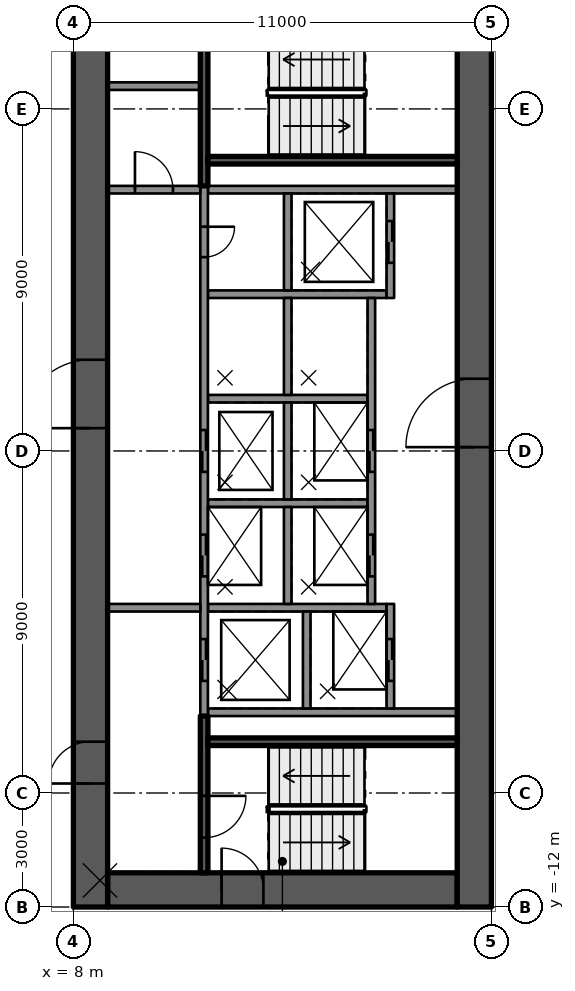
"""IFC4 building model, lengths in metres.
Left out: names, types, materials, properties, quantities, classifications, styles, units other than length and angle.
Written with IfcOpenShell. Run it as: python <this file> out.ifc"""

import sys

from ifc_helpers import new_model, si_unit, direction, frame, frame_2d, origin, place, context, subcontext, project, spatial, rectangle, extrude, element, fill, save


model = new_model("IFC4")
c1 = context("Model", 3, precision=1e-05, world=origin(), true_north=direction((0.0, 1.0)))
c2 = subcontext(c1, "Body", "Model", "MODEL_VIEW")
j1 = project(units=[si_unit("LENGTHUNIT", "METRE"), si_unit("PLANEANGLEUNIT", "RADIAN")], contexts=[c1])
p1 = place(None, origin())
s1 = spatial("IfcSite", under=j1, at=p1, CompositionType="ELEMENT")
p2 = place(p1, origin())
s2 = spatial("IfcBuilding", under=s1, at=p2, CompositionType="ELEMENT")
p3 = place(p2, frame((0.0, 0.0, 91.2)))
s3 = spatial("IfcBuildingStorey", under=s2, at=p3, CompositionType="ELEMENT", Elevation=91.2)
p4 = place(p3, frame((8.9, -11.55, 0.0), z_axis=(0.0, 0.0, 1.0), x_axis=(1.0, 0.0, 0.0)))
e1 = element("IfcWall", 1, at=p4, inside=s3, PredefinedType="SHEAR", context=c2, shape_type="SweptSolid", body=[
    extrude(rectangle(XDim=9.2, YDim=0.9, at=frame_2d((4.6, 0.0))), origin(), (0.0, 0.0, 1.0), 3.5),
])
p5 = place(p4, frame((3.0, 0.0, 0.0)))
e2 = element("IfcOpeningElement", 2, at=p5, cuts=e1, PredefinedType="OPENING", context=c2, shape_type="SweptSolid", body=[
    extrude(rectangle(XDim=1.1, YDim=2.1, at=frame_2d((0.55, 1.05))), frame((0.0, 0.46, 0.0), z_axis=(0.0, -1.0, 0.0), x_axis=(1.0, 0.0, 0.0)), (0.0, 0.0, 1.0), 0.92),
])
p6 = place(p3, frame((8.45, -12.0, 0.0), z_axis=(0.0, 0.0, 1.0), x_axis=(0.0, 1.0, 0.0)))
e3 = element("IfcWall", 3, at=p6, inside=s3, PredefinedType="SHEAR", context=c2, shape_type="SweptSolid", body=[
    extrude(rectangle(XDim=24.0, YDim=0.9, at=frame_2d((12.0, 0.0))), origin(), (0.0, 0.0, 1.0), 3.5),
])
p7 = place(p6, frame((12.6, 0.0, 0.0)))
e4 = element("IfcOpeningElement", 4, at=p7, cuts=e3, PredefinedType="OPENING", context=c2, shape_type="SweptSolid", body=[
    extrude(rectangle(XDim=1.8, YDim=2.1, at=frame_2d((0.9, 1.05))), frame((0.0, 0.46, 0.0), z_axis=(0.0, -1.0, 0.0), x_axis=(1.0, 0.0, 0.0)), (0.0, 0.0, 1.0), 0.92),
])
p8 = place(p6, frame((3.25, 0.0, 0.0)))
e5 = element("IfcOpeningElement", 5, at=p8, cuts=e3, PredefinedType="OPENING", context=c2, shape_type="SweptSolid", body=[
    extrude(rectangle(XDim=1.1, YDim=2.1, at=frame_2d((0.55, 1.05))), frame((0.0, 0.46, 0.0), z_axis=(0.0, -1.0, 0.0), x_axis=(1.0, 0.0, 0.0)), (0.0, 0.0, 1.0), 0.92),
])
p9 = place(p3, frame((18.55, -12.0, 0.0), z_axis=(0.0, 0.0, 1.0), x_axis=(0.0, 1.0, 0.0)))
e6 = element("IfcWall", 6, at=p9, inside=s3, PredefinedType="SHEAR", context=c2, shape_type="SweptSolid", body=[
    extrude(rectangle(XDim=24.0, YDim=0.9, at=frame_2d((12.0, 0.0))), origin(), (0.0, 0.0, 1.0), 3.5),
])
p10 = place(p9, frame((12.1, 0.0, 0.0)))
e7 = element("IfcOpeningElement", 7, at=p10, cuts=e6, PredefinedType="OPENING", context=c2, shape_type="SweptSolid", body=[
    extrude(rectangle(XDim=1.8, YDim=2.1, at=frame_2d((0.9, 1.05))), frame((0.0, 0.46, 0.0), z_axis=(0.0, -1.0, 0.0), x_axis=(1.0, 0.0, 0.0)), (0.0, 0.0, 1.0), 0.92),
])
for number, where, z_axis, x_axis in (
    (8, (11.54, -6.875, 0.0), (0.0, 0.0, 1.0), (1.0, 0.0, 0.0)),
    (9, (11.54, 6.875, 0.0), (0.0, 0.0, 1.0), (1.0, 0.0, 0.0)),
):
    element("IfcWall", number, at=place(p3, frame(where, z_axis=z_axis, x_axis=x_axis)), inside=s3, PredefinedType="SOLIDWALL", context=c2, shape_type="SweptSolid", body=[
        extrude(rectangle(XDim=6.56, YDim=0.2, at=frame_2d((3.28, 0.0))), origin(), (0.0, 0.0, 1.0), 3.09),
    ])
p11 = place(p3, frame((11.54, 4.125, 0.0), z_axis=(0.0, 0.0, 1.0), x_axis=(1.0, 0.0, 0.0)))
e10 = element("IfcWall", 10, at=p11, inside=s3, PredefinedType="SOLIDWALL", context=c2, shape_type="SweptSolid", body=[
    extrude(rectangle(XDim=4.7, YDim=0.2, at=frame_2d((2.35, 0.0))), origin(), (0.0, 0.0, 1.0), 3.09),
])
for number, where, z_axis, x_axis in (
    (11, (11.54, 1.375, 0.0), (0.0, 0.0, 1.0), (1.0, 0.0, 0.0)),
    (12, (11.54, -1.375, 0.0), (0.0, 0.0, 1.0), (1.0, 0.0, 0.0)),
):
    element("IfcWall", number, at=place(p3, frame(where, z_axis=z_axis, x_axis=x_axis)), inside=s3, PredefinedType="SOLIDWALL", context=c2, shape_type="SweptSolid", body=[
        extrude(rectangle(XDim=4.2, YDim=0.2, at=frame_2d((2.1, 0.0))), origin(), (0.0, 0.0, 1.0), 3.09),
    ])
p12 = place(p3, frame((11.54, -4.125, 0.0), z_axis=(0.0, 0.0, 1.0), x_axis=(1.0, 0.0, 0.0)))
e13 = element("IfcWall", 13, at=p12, inside=s3, PredefinedType="SOLIDWALL", context=c2, shape_type="SweptSolid", body=[
    extrude(rectangle(XDim=4.7, YDim=0.2, at=frame_2d((2.35, 0.0))), origin(), (0.0, 0.0, 1.0), 3.09),
])
p13 = place(p3, frame((11.44, 6.975, 0.0), z_axis=(0.0, 0.0, 1.0), x_axis=(0.0, -1.0, 0.0)))
e14 = element("IfcWall", 14, at=p13, inside=s3, PredefinedType="SOLIDWALL", context=c2, shape_type="SweptSolid", body=[
    extrude(rectangle(XDim=13.95, YDim=0.2, at=frame_2d((6.975, 0.0))), origin(), (0.0, 0.0, 1.0), 3.09),
])
p14 = place(p13, frame((6.425, 0.0, 0.0)))
e15 = element("IfcOpeningElement", 15, at=p14, cuts=e14, PredefinedType="OPENING", context=c2, shape_type="SweptSolid", body=[
    extrude(rectangle(XDim=1.1, YDim=2.1, at=frame_2d((0.55, 1.05))), frame((0.0, 0.11, 0.0), z_axis=(0.0, -1.0, 0.0), x_axis=(1.0, 0.0, 0.0)), (0.0, 0.0, 1.0), 0.22),
])
p15 = place(p13, frame((9.175, 0.0, 0.0)))
e16 = element("IfcOpeningElement", 16, at=p15, cuts=e14, PredefinedType="OPENING", context=c2, shape_type="SweptSolid", body=[
    extrude(rectangle(XDim=1.1, YDim=2.1, at=frame_2d((0.55, 1.05))), frame((0.0, 0.11, 0.0), z_axis=(0.0, -1.0, 0.0), x_axis=(1.0, 0.0, 0.0)), (0.0, 0.0, 1.0), 0.22),
])
p16 = place(p13, frame((11.925, 0.0, 0.0)))
e17 = element("IfcOpeningElement", 17, at=p16, cuts=e14, PredefinedType="OPENING", context=c2, shape_type="SweptSolid", body=[
    extrude(rectangle(XDim=1.1, YDim=2.1, at=frame_2d((0.55, 1.05))), frame((0.0, 0.11, 0.0), z_axis=(0.0, -1.0, 0.0), x_axis=(1.0, 0.0, 0.0)), (0.0, 0.0, 1.0), 0.22),
])
p17 = place(p13, frame((1.075, 0.0, 0.0)))
e18 = element("IfcOpeningElement", 18, at=p17, cuts=e14, PredefinedType="OPENING", context=c2, shape_type="SweptSolid", body=[
    extrude(rectangle(XDim=0.8, YDim=2.1, at=frame_2d((0.4, 1.05))), frame((0.0, 0.11, 0.0), z_axis=(0.0, -1.0, 0.0), x_axis=(1.0, 0.0, 0.0)), (0.0, 0.0, 1.0), 0.22),
])
for number, where, z_axis, x_axis in (
    (19, (13.64, 6.775, 0.0), (0.0, 0.0, 1.0), (0.0, -1.0, 0.0)),
    (20, (13.64, 4.025, 0.0), (0.0, 0.0, 1.0), (0.0, -1.0, 0.0)),
    (21, (13.64, 1.275, 0.0), (0.0, 0.0, 1.0), (0.0, -1.0, 0.0)),
    (22, (13.64, -1.475, 0.0), (0.0, 0.0, 1.0), (0.0, -1.0, 0.0)),
    (23, (14.14, -4.225, 0.0), (0.0, 0.0, 1.0), (0.0, -1.0, 0.0)),
):
    element("IfcWall", number, at=place(p3, frame(where, z_axis=z_axis, x_axis=x_axis)), inside=s3, PredefinedType="SOLIDWALL", context=c2, shape_type="SweptSolid", body=[
        extrude(rectangle(XDim=2.55, YDim=0.2, at=frame_2d((1.275, 0.0))), origin(), (0.0, 0.0, 1.0), 3.09),
    ])
p18 = place(p3, frame((16.34, 6.775, 0.0), z_axis=(0.0, 0.0, 1.0), x_axis=(0.0, -1.0, 0.0)))
e24 = element("IfcWall", 24, at=p18, inside=s3, PredefinedType="SOLIDWALL", context=c2, shape_type="SweptSolid", body=[
    extrude(rectangle(XDim=2.75, YDim=0.2, at=frame_2d((1.375, 0.0))), origin(), (0.0, 0.0, 1.0), 3.09),
])
p19 = place(p18, frame((0.725, 0.0, 0.0)))
e25 = element("IfcOpeningElement", 25, at=p19, cuts=e24, PredefinedType="OPENING", context=c2, shape_type="SweptSolid", body=[
    extrude(rectangle(XDim=1.1, YDim=2.1, at=frame_2d((0.55, 1.05))), frame((0.0, 0.11, 0.0), z_axis=(0.0, -1.0, 0.0), x_axis=(1.0, 0.0, 0.0)), (0.0, 0.0, 1.0), 0.22),
])
p20 = place(p3, frame((15.84, 4.025, 0.0), z_axis=(0.0, 0.0, 1.0), x_axis=(0.0, -1.0, 0.0)))
e26 = element("IfcWall", 26, at=p20, inside=s3, PredefinedType="SOLIDWALL", context=c2, shape_type="SweptSolid", body=[
    extrude(rectangle(XDim=8.05, YDim=0.2, at=frame_2d((4.025, 0.0))), origin(), (0.0, 0.0, 1.0), 3.09),
])
p21 = place(p20, frame((3.475, 0.0, 0.0)))
e27 = element("IfcOpeningElement", 27, at=p21, cuts=e26, PredefinedType="OPENING", context=c2, shape_type="SweptSolid", body=[
    extrude(rectangle(XDim=1.1, YDim=2.1, at=frame_2d((0.55, 1.05))), frame((0.0, 0.11, 0.0), z_axis=(0.0, -1.0, 0.0), x_axis=(1.0, 0.0, 0.0)), (0.0, 0.0, 1.0), 0.22),
])
p22 = place(p20, frame((6.225, 0.0, 0.0)))
e28 = element("IfcOpeningElement", 28, at=p22, cuts=e26, PredefinedType="OPENING", context=c2, shape_type="SweptSolid", body=[
    extrude(rectangle(XDim=1.1, YDim=2.1, at=frame_2d((0.55, 1.05))), frame((0.0, 0.11, 0.0), z_axis=(0.0, -1.0, 0.0), x_axis=(1.0, 0.0, 0.0)), (0.0, 0.0, 1.0), 0.22),
])
p23 = place(p3, frame((16.34, -4.025, 0.0), z_axis=(0.0, 0.0, 1.0), x_axis=(0.0, -1.0, 0.0)))
e29 = element("IfcWall", 29, at=p23, inside=s3, PredefinedType="SOLIDWALL", context=c2, shape_type="SweptSolid", body=[
    extrude(rectangle(XDim=2.75, YDim=0.2, at=frame_2d((1.375, 0.0))), origin(), (0.0, 0.0, 1.0), 3.09),
])
p24 = place(p23, frame((0.925, 0.0, 0.0)))
e30 = element("IfcOpeningElement", 30, at=p24, cuts=e29, PredefinedType="OPENING", context=c2, shape_type="SweptSolid", body=[
    extrude(rectangle(XDim=1.1, YDim=2.1, at=frame_2d((0.55, 1.05))), frame((0.0, 0.11, 0.0), z_axis=(0.0, -1.0, 0.0), x_axis=(1.0, 0.0, 0.0)), (0.0, 0.0, 1.0), 0.22),
])
p25 = place(p3, frame((11.44, -6.975, 0.0), z_axis=(0.0, 0.0, 1.0), x_axis=(0.0, -1.0, 0.0)))
e31 = element("IfcWall", 31, at=p25, inside=s3, PredefinedType="SOLIDWALL", context=c2, shape_type="SweptSolid", body=[
    extrude(rectangle(XDim=4.125, YDim=0.2, at=frame_2d((2.062, 0.0))), origin(), (0.0, 0.0, 1.0), 3.09),
])
p26 = place(p25, frame((2.1, 0.0, 0.0)))
e32 = element("IfcOpeningElement", 32, at=p26, cuts=e31, PredefinedType="OPENING", context=c2, shape_type="SweptSolid", body=[
    extrude(rectangle(XDim=1.1, YDim=2.1, at=frame_2d((0.55, 1.05))), frame((0.0, 0.11, 0.0), z_axis=(0.0, -1.0, 0.0), x_axis=(1.0, 0.0, 0.0)), (0.0, 0.0, 1.0), 0.22),
])
p27 = place(p3, frame((11.54, -7.65, 0.0), z_axis=(0.0, 0.0, 1.0), x_axis=(1.0, 0.0, 0.0)))
e33 = element("IfcWall", 33, at=p27, inside=s3, PredefinedType="SOLIDWALL", context=c2, shape_type="SweptSolid", body=[
    extrude(rectangle(XDim=6.56, YDim=0.2, at=frame_2d((3.28, 0.0))), origin(), (0.0, 0.0, 1.0), 3.09),
])
p28 = place(p3, frame((11.44, 11.1, 0.0), z_axis=(0.0, 0.0, 1.0), x_axis=(0.0, -1.0, 0.0)))
e34 = element("IfcWall", 34, at=p28, inside=s3, PredefinedType="SOLIDWALL", context=c2, shape_type="SweptSolid", body=[
    extrude(rectangle(XDim=4.125, YDim=0.2, at=frame_2d((2.062, 0.0))), origin(), (0.0, 0.0, 1.0), 3.09),
])
p29 = place(p3, frame((11.54, 7.65, 0.0), z_axis=(0.0, 0.0, 1.0), x_axis=(1.0, 0.0, 0.0)))
e35 = element("IfcWall", 35, at=p29, inside=s3, PredefinedType="SOLIDWALL", context=c2, shape_type="SweptSolid", body=[
    extrude(rectangle(XDim=6.56, YDim=0.2, at=frame_2d((3.28, 0.0))), origin(), (0.0, 0.0, 1.0), 3.09),
])
p30 = place(p3, frame((8.9, -4.125, 0.0), z_axis=(0.0, 0.0, 1.0), x_axis=(1.0, 0.0, 0.0)))
e36 = element("IfcWall", 36, at=p30, inside=s3, PredefinedType="PARTITIONING", context=c2, shape_type="SweptSolid", body=[
    extrude(rectangle(XDim=2.44, YDim=0.2, at=frame_2d((1.22, 0.0))), origin(), (0.0, 0.0, 1.0), 3.09),
])
p31 = place(p3, frame((8.9, 6.875, 0.0), z_axis=(0.0, 0.0, 1.0), x_axis=(1.0, 0.0, 0.0)))
e37 = element("IfcWall", 37, at=p31, inside=s3, PredefinedType="PARTITIONING", context=c2, shape_type="SweptSolid", body=[
    extrude(rectangle(XDim=2.44, YDim=0.2, at=frame_2d((1.22, 0.0))), origin(), (0.0, 0.0, 1.0), 3.09),
])
p32 = place(p31, frame((0.72, 0.0, 0.0)))
e38 = element("IfcOpeningElement", 38, at=p32, cuts=e37, PredefinedType="OPENING", context=c2, shape_type="SweptSolid", body=[
    extrude(rectangle(XDim=1.0, YDim=2.1, at=frame_2d((0.5, 1.05))), frame((0.0, 0.11, 0.0), z_axis=(0.0, -1.0, 0.0), x_axis=(1.0, 0.0, 0.0)), (0.0, 0.0, 1.0), 0.22),
])
p33 = place(p3, frame((8.9, 9.6, 0.0), z_axis=(0.0, 0.0, 1.0), x_axis=(1.0, 0.0, 0.0)))
e39 = element("IfcWall", 39, at=p33, inside=s3, PredefinedType="PARTITIONING", context=c2, shape_type="SweptSolid", body=[
    extrude(rectangle(XDim=2.44, YDim=0.2, at=frame_2d((1.22, 0.0))), origin(), (0.0, 0.0, 1.0), 3.09),
])
p34 = place(p19, origin())
e40 = element("IfcDoor", 40, at=p34, inside=s3, OperationType="DOUBLE_DOOR_SLIDING", PredefinedType="DOOR", context=c2, shape_type="SweptSolid", body=[
    extrude(rectangle(XDim=1.1, YDim=2.1, at=frame_2d((0.55, 1.05))), frame((0.0, 0.025, 0.0), z_axis=(0.0, -1.0, 0.0), x_axis=(1.0, 0.0, 0.0)), (0.0, 0.0, 1.0), 0.05),
])
fill(e25, e40)
p35 = place(p14, origin())
e41 = element("IfcDoor", 41, at=p35, inside=s3, OperationType="DOUBLE_DOOR_SLIDING", PredefinedType="DOOR", context=c2, shape_type="SweptSolid", body=[
    extrude(rectangle(XDim=1.1, YDim=2.1, at=frame_2d((0.55, 1.05))), frame((0.0, 0.025, 0.0), z_axis=(0.0, -1.0, 0.0), x_axis=(1.0, 0.0, 0.0)), (0.0, 0.0, 1.0), 0.05),
])
fill(e15, e41)
p36 = place(p21, origin())
e42 = element("IfcDoor", 42, at=p36, inside=s3, OperationType="DOUBLE_DOOR_SLIDING", PredefinedType="DOOR", context=c2, shape_type="SweptSolid", body=[
    extrude(rectangle(XDim=1.1, YDim=2.1, at=frame_2d((0.55, 1.05))), frame((0.0, 0.025, 0.0), z_axis=(0.0, -1.0, 0.0), x_axis=(1.0, 0.0, 0.0)), (0.0, 0.0, 1.0), 0.05),
])
fill(e27, e42)
p37 = place(p15, origin())
e43 = element("IfcDoor", 43, at=p37, inside=s3, OperationType="DOUBLE_DOOR_SLIDING", PredefinedType="DOOR", context=c2, shape_type="SweptSolid", body=[
    extrude(rectangle(XDim=1.1, YDim=2.1, at=frame_2d((0.55, 1.05))), frame((0.0, 0.025, 0.0), z_axis=(0.0, -1.0, 0.0), x_axis=(1.0, 0.0, 0.0)), (0.0, 0.0, 1.0), 0.05),
])
fill(e16, e43)
p38 = place(p22, origin())
e44 = element("IfcDoor", 44, at=p38, inside=s3, OperationType="DOUBLE_DOOR_SLIDING", PredefinedType="DOOR", context=c2, shape_type="SweptSolid", body=[
    extrude(rectangle(XDim=1.1, YDim=2.1, at=frame_2d((0.55, 1.05))), frame((0.0, 0.025, 0.0), z_axis=(0.0, -1.0, 0.0), x_axis=(1.0, 0.0, 0.0)), (0.0, 0.0, 1.0), 0.05),
])
fill(e28, e44)
p39 = place(p16, origin())
e45 = element("IfcDoor", 45, at=p39, inside=s3, OperationType="DOUBLE_DOOR_SLIDING", PredefinedType="DOOR", context=c2, shape_type="SweptSolid", body=[
    extrude(rectangle(XDim=1.1, YDim=2.1, at=frame_2d((0.55, 1.05))), frame((0.0, 0.025, 0.0), z_axis=(0.0, -1.0, 0.0), x_axis=(1.0, 0.0, 0.0)), (0.0, 0.0, 1.0), 0.05),
])
fill(e17, e45)
p40 = place(p24, origin())
e46 = element("IfcDoor", 46, at=p40, inside=s3, OperationType="DOUBLE_DOOR_SLIDING", PredefinedType="DOOR", context=c2, shape_type="SweptSolid", body=[
    extrude(rectangle(XDim=1.1, YDim=2.1, at=frame_2d((0.55, 1.05))), frame((0.0, 0.025, 0.0), z_axis=(0.0, -1.0, 0.0), x_axis=(1.0, 0.0, 0.0)), (0.0, 0.0, 1.0), 0.05),
])
fill(e30, e46)
p41 = place(p17, origin())
e47 = element("IfcDoor", 47, at=p41, inside=s3, OperationType="SINGLE_SWING_LEFT", PredefinedType="DOOR", context=c2, shape_type="SweptSolid", body=[
    extrude(rectangle(XDim=0.8, YDim=2.1, at=frame_2d((0.4, 1.05))), frame((0.0, 0.025, 0.0), z_axis=(0.0, -1.0, 0.0), x_axis=(1.0, 0.0, 0.0)), (0.0, 0.0, 1.0), 0.05),
])
fill(e18, e47)
p42 = place(p7, origin())
e48 = element("IfcDoor", 48, at=p42, inside=s3, OperationType="SINGLE_SWING_RIGHT", PredefinedType="DOOR", context=c2, shape_type="SweptSolid", body=[
    extrude(rectangle(XDim=1.8, YDim=2.1, at=frame_2d((0.9, 1.05))), frame((0.0, 0.025, 0.0), z_axis=(0.0, -1.0, 0.0), x_axis=(1.0, 0.0, 0.0)), (0.0, 0.0, 1.0), 0.05),
])
fill(e4, e48)
p43 = place(p10, origin())
e49 = element("IfcDoor", 49, at=p43, inside=s3, OperationType="SINGLE_SWING_RIGHT", PredefinedType="DOOR", context=c2, shape_type="SweptSolid", body=[
    extrude(rectangle(XDim=1.8, YDim=2.1, at=frame_2d((0.9, 1.05))), frame((0.0, 0.025, 0.0), z_axis=(0.0, -1.0, 0.0), x_axis=(1.0, 0.0, 0.0)), (0.0, 0.0, 1.0), 0.05),
])
fill(e7, e49)
p44 = place(p8, origin())
e50 = element("IfcDoor", 50, at=p44, inside=s3, OperationType="SINGLE_SWING_LEFT", PredefinedType="DOOR", context=c2, shape_type="SweptSolid", body=[
    extrude(rectangle(XDim=1.1, YDim=2.1, at=frame_2d((0.55, 1.05))), frame((0.0, 0.025, 0.0), z_axis=(0.0, -1.0, 0.0), x_axis=(1.0, 0.0, 0.0)), (0.0, 0.0, 1.0), 0.05),
])
fill(e5, e50)
p45 = place(p5, origin())
e51 = element("IfcDoor", 51, at=p45, inside=s3, OperationType="SINGLE_SWING_LEFT", PredefinedType="DOOR", context=c2, shape_type="SweptSolid", body=[
    extrude(rectangle(XDim=1.1, YDim=2.1, at=frame_2d((0.55, 1.05))), frame((0.0, 0.025, 0.0), z_axis=(0.0, -1.0, 0.0), x_axis=(1.0, 0.0, 0.0)), (0.0, 0.0, 1.0), 0.05),
])
fill(e2, e51)
p46 = place(p26, origin())
e52 = element("IfcDoor", 52, at=p46, inside=s3, OperationType="SINGLE_SWING_RIGHT", PredefinedType="DOOR", context=c2, shape_type="SweptSolid", body=[
    extrude(rectangle(XDim=1.1, YDim=2.1, at=frame_2d((0.55, 1.05))), frame((0.0, 0.025, 0.0), z_axis=(0.0, -1.0, 0.0), x_axis=(1.0, 0.0, 0.0)), (0.0, 0.0, 1.0), 0.05),
])
fill(e32, e52)
p47 = place(p32, origin())
e53 = element("IfcDoor", 53, at=p47, inside=s3, OperationType="SINGLE_SWING_RIGHT", PredefinedType="DOOR", context=c2, shape_type="SweptSolid", body=[
    extrude(rectangle(XDim=1.0, YDim=2.1, at=frame_2d((0.5, 1.05))), frame((0.0, 0.025, 0.0), z_axis=(0.0, -1.0, 0.0), x_axis=(1.0, 0.0, 0.0)), (0.0, 0.0, 1.0), 0.05),
])
fill(e38, e53)
save(model, sys.argv[1])
